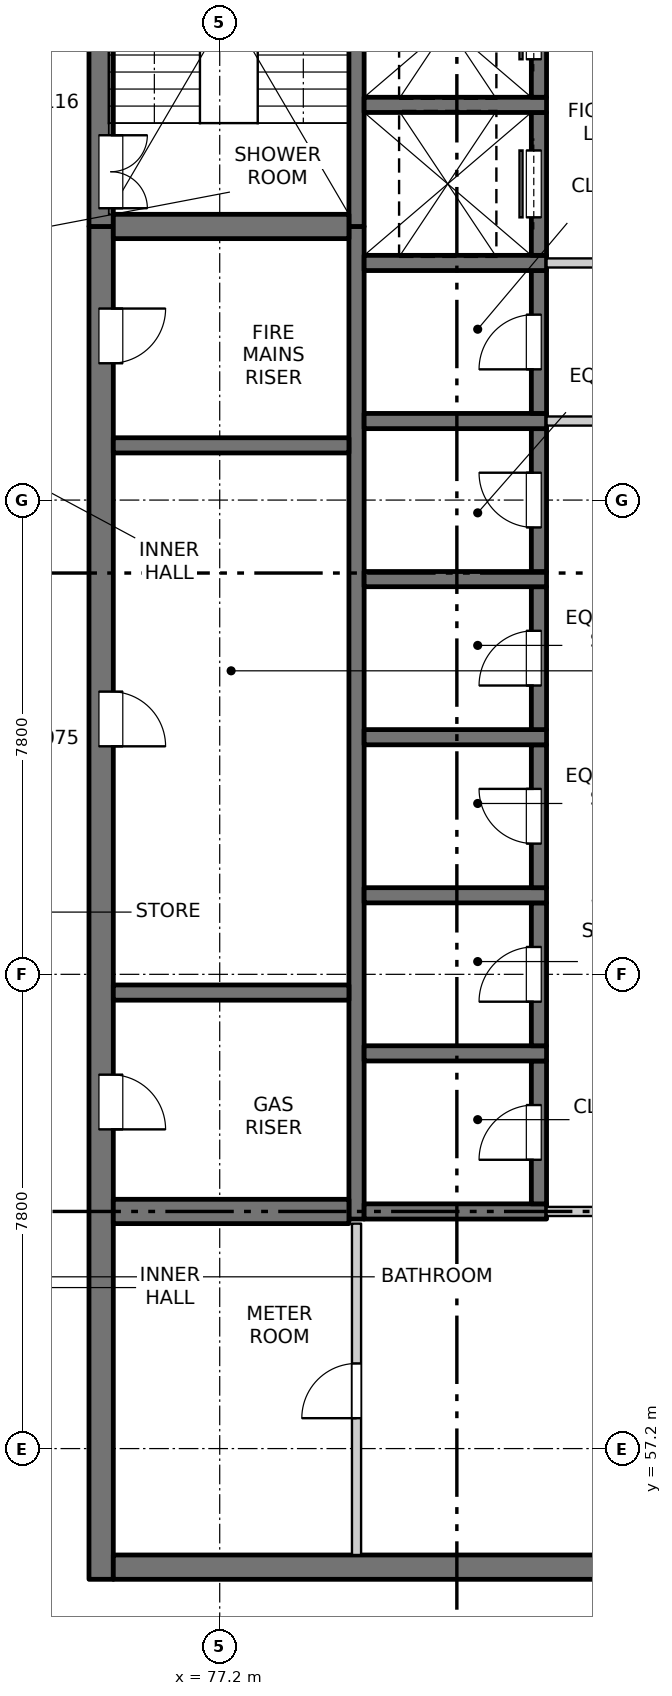
"""IFC4 building model, lengths in metres.
Left out: names, types, materials, properties, quantities, classifications, styles, units other than length and angle.
Written with IfcOpenShell. Run it as: python <this file> out.ifc"""

import sys

from ifc_helpers import new_model, si_unit, direction, frame, frame_2d, origin, place, context, subcontext, project, spatial, rectangle, extrude, element, fill, save


model = new_model("IFC4")
c1 = context("Model", 3, precision=1e-05, world=origin(), true_north=direction((0.0, 1.0)))
c2 = subcontext(c1, "Body", "Model", "MODEL_VIEW")
j1 = project(units=[si_unit("LENGTHUNIT", "METRE"), si_unit("PLANEANGLEUNIT", "RADIAN")], contexts=[c1])
p1 = place(None, origin())
s1 = spatial("IfcSite", under=j1, at=p1, CompositionType="ELEMENT")
p2 = place(p1, origin())
s2 = spatial("IfcBuilding", under=s1, at=p2, CompositionType="ELEMENT")
p3 = place(p2, frame((0.0, 0.0, 221.1)))
s3 = spatial("IfcBuildingStorey", under=s2, at=p3, CompositionType="ELEMENT", Elevation=221.1)
p4 = place(p3, frame((75.25, 55.05, -0.25), z_axis=(0.0, 0.0, 1.0), x_axis=(0.0, 1.0, 0.0)))
e1 = element("IfcWall", 1, at=p4, inside=s3, PredefinedType="SOLIDWALL", context=c2, shape_type="SweptSolid", body=[
    extrude(rectangle(XDim=22.25, YDim=0.4, at=frame_2d((11.125, 0.0))), origin(), (0.0, 0.0, 1.0), 3.4),
])
p5 = place(p4, frame((7.4, 0.0, 0.25)))
e2 = element("IfcOpeningElement", 2, at=p5, cuts=e1, PredefinedType="OPENING", context=c2, shape_type="SweptSolid", body=[
    extrude(rectangle(XDim=0.9, YDim=2.1, at=frame_2d((0.45, 1.05))), frame((0.0, 0.21, 0.0), z_axis=(0.0, -1.0, 0.0), x_axis=(1.0, 0.0, 0.0)), (0.0, 0.0, 1.0), 0.42),
])
p6 = place(p4, frame((13.7, 0.0, 0.25)))
e3 = element("IfcOpeningElement", 3, at=p6, cuts=e1, PredefinedType="OPENING", context=c2, shape_type="SweptSolid", body=[
    extrude(rectangle(XDim=0.9, YDim=2.1, at=frame_2d((0.45, 1.05))), frame((0.0, 0.21, 0.0), z_axis=(0.0, -1.0, 0.0), x_axis=(1.0, 0.0, 0.0)), (0.0, 0.0, 1.0), 0.42),
])
p7 = place(p4, frame((20.0, 0.0, 0.25)))
e4 = element("IfcOpeningElement", 4, at=p7, cuts=e1, PredefinedType="OPENING", context=c2, shape_type="SweptSolid", body=[
    extrude(rectangle(XDim=0.9, YDim=2.1, at=frame_2d((0.45, 1.05))), frame((0.0, 0.21, 0.0), z_axis=(0.0, -1.0, 0.0), x_axis=(1.0, 0.0, 0.0)), (0.0, 0.0, 1.0), 0.42),
])
p8 = place(p3, frame((75.25, 77.3, -0.25), z_axis=(0.0, 0.0, 1.0), x_axis=(0.0, 1.0, 0.0)))
e5 = element("IfcWall", 5, at=p8, inside=s3, PredefinedType="SOLIDWALL", context=c2, shape_type="SweptSolid", body=[
    extrude(rectangle(XDim=7.4, YDim=0.4, at=frame_2d((3.7, 0.0))), origin(), (0.0, 0.0, 1.0), 3.4),
])
p9 = place(p8, frame((0.3, 0.0, 0.25)))
e6 = element("IfcOpeningElement", 6, at=p9, cuts=e5, PredefinedType="OPENING", context=c2, shape_type="SweptSolid", body=[
    extrude(rectangle(XDim=1.2, YDim=2.1, at=frame_2d((0.6, 1.05))), frame((0.0, 0.21, 0.0), z_axis=(0.0, -1.0, 0.0), x_axis=(1.0, 0.0, 0.0)), (0.0, 0.0, 1.0), 0.42),
])
p10 = place(p3, frame((75.45, 55.25, -0.25), z_axis=(0.0, 0.0, 1.0), x_axis=(1.0, 0.0, 0.0)))
e7 = element("IfcWall", 7, at=p10, inside=s3, PredefinedType="SOLIDWALL", context=c2, shape_type="SweptSolid", body=[
    extrude(rectangle(XDim=19.1, YDim=0.4, at=frame_2d((9.55, 0.0))), origin(), (0.0, 0.0, 1.0), 3.4),
])
p11 = place(p10, frame((8.8, 0.0, 0.25)))
e8 = element("IfcOpeningElement", 8, at=p11, cuts=e7, PredefinedType="OPENING", context=c2, shape_type="SweptSolid", body=[
    extrude(rectangle(XDim=1.5, YDim=2.1, at=frame_2d((0.75, 1.05))), frame((0.0, 0.21, 0.0), z_axis=(0.0, -1.0, 0.0), x_axis=(1.0, 0.0, 0.0)), (0.0, 0.0, 1.0), 0.42),
])
p12 = place(p3, frame((79.45, 60.975, -0.25), z_axis=(0.0, 0.0, 1.0), x_axis=(0.0, 1.0, 0.0)))
e9 = element("IfcWall", 9, at=p12, inside=s3, PredefinedType="SOLIDWALL", context=c2, shape_type="SweptSolid", body=[
    extrude(rectangle(XDim=16.325, YDim=0.25, at=frame_2d((8.163, 0.0))), origin(), (0.0, 0.0, 1.0), 3.4),
])
p13 = place(p3, frame((79.45, 77.3, -0.25), z_axis=(0.0, 0.0, 1.0), x_axis=(0.0, 1.0, 0.0)))
e10 = element("IfcWall", 10, at=p13, inside=s3, PredefinedType="SOLIDWALL", context=c2, shape_type="SweptSolid", body=[
    extrude(rectangle(XDim=7.0, YDim=0.25, at=frame_2d((3.5, 0.0))), origin(), (0.0, 0.0, 1.0), 3.4),
])
p14 = place(p3, frame((79.575, 61.1, -0.25), z_axis=(0.0, 0.0, 1.0), x_axis=(1.0, 0.0, 0.0)))
e11 = element("IfcWall", 11, at=p14, inside=s3, PredefinedType="SOLIDWALL", context=c2, shape_type="SweptSolid", body=[
    extrude(rectangle(XDim=3.0, YDim=0.25, at=frame_2d((1.5, 0.0))), origin(), (0.0, 0.0, 1.0), 3.4),
])
p15 = place(p3, frame((82.45, 61.225, -0.25), z_axis=(0.0, 0.0, 1.0), x_axis=(0.0, 1.0, 0.0)))
e12 = element("IfcWall", 12, at=p15, inside=s3, PredefinedType="SOLIDWALL", context=c2, shape_type="SweptSolid", body=[
    extrude(rectangle(XDim=2.35, YDim=0.25, at=frame_2d((1.175, 0.0))), origin(), (0.0, 0.0, 1.0), 3.4),
])
p16 = place(p15, frame((0.725, 0.0, 0.25)))
e13 = element("IfcOpeningElement", 13, at=p16, cuts=e12, PredefinedType="OPENING", context=c2, shape_type="SweptSolid", body=[
    extrude(rectangle(XDim=0.9, YDim=2.1, at=frame_2d((0.45, 1.05))), frame((0.0, 0.135, 0.0), z_axis=(0.0, -1.0, 0.0), x_axis=(1.0, 0.0, 0.0)), (0.0, 0.0, 1.0), 0.27),
])
p17 = place(p3, frame((79.575, 63.7, -0.25), z_axis=(0.0, 0.0, 1.0), x_axis=(1.0, 0.0, 0.0)))
e14 = element("IfcWall", 14, at=p17, inside=s3, PredefinedType="SOLIDWALL", context=c2, shape_type="SweptSolid", body=[
    extrude(rectangle(XDim=3.0, YDim=0.25, at=frame_2d((1.5, 0.0))), origin(), (0.0, 0.0, 1.0), 3.4),
])
p18 = place(p3, frame((82.45, 63.825, -0.25), z_axis=(0.0, 0.0, 1.0), x_axis=(0.0, 1.0, 0.0)))
e15 = element("IfcWall", 15, at=p18, inside=s3, PredefinedType="SOLIDWALL", context=c2, shape_type="SweptSolid", body=[
    extrude(rectangle(XDim=2.35, YDim=0.25, at=frame_2d((1.175, 0.0))), origin(), (0.0, 0.0, 1.0), 3.4),
])
p19 = place(p18, frame((0.725, 0.0, 0.25)))
e16 = element("IfcOpeningElement", 16, at=p19, cuts=e15, PredefinedType="OPENING", context=c2, shape_type="SweptSolid", body=[
    extrude(rectangle(XDim=0.9, YDim=2.1, at=frame_2d((0.45, 1.05))), frame((0.0, 0.135, 0.0), z_axis=(0.0, -1.0, 0.0), x_axis=(1.0, 0.0, 0.0)), (0.0, 0.0, 1.0), 0.27),
])
p20 = place(p3, frame((79.575, 66.3, -0.25), z_axis=(0.0, 0.0, 1.0), x_axis=(1.0, 0.0, 0.0)))
e17 = element("IfcWall", 17, at=p20, inside=s3, PredefinedType="SOLIDWALL", context=c2, shape_type="SweptSolid", body=[
    extrude(rectangle(XDim=3.0, YDim=0.25, at=frame_2d((1.5, 0.0))), origin(), (0.0, 0.0, 1.0), 3.4),
])
p21 = place(p3, frame((82.45, 66.425, -0.25), z_axis=(0.0, 0.0, 1.0), x_axis=(0.0, 1.0, 0.0)))
e18 = element("IfcWall", 18, at=p21, inside=s3, PredefinedType="SOLIDWALL", context=c2, shape_type="SweptSolid", body=[
    extrude(rectangle(XDim=2.35, YDim=0.25, at=frame_2d((1.175, 0.0))), origin(), (0.0, 0.0, 1.0), 3.4),
])
p22 = place(p21, frame((0.725, 0.0, 0.25)))
e19 = element("IfcOpeningElement", 19, at=p22, cuts=e18, PredefinedType="OPENING", context=c2, shape_type="SweptSolid", body=[
    extrude(rectangle(XDim=0.9, YDim=2.1, at=frame_2d((0.45, 1.05))), frame((0.0, 0.135, 0.0), z_axis=(0.0, -1.0, 0.0), x_axis=(1.0, 0.0, 0.0)), (0.0, 0.0, 1.0), 0.27),
])
p23 = place(p3, frame((79.575, 68.9, -0.25), z_axis=(0.0, 0.0, 1.0), x_axis=(1.0, 0.0, 0.0)))
e20 = element("IfcWall", 20, at=p23, inside=s3, PredefinedType="SOLIDWALL", context=c2, shape_type="SweptSolid", body=[
    extrude(rectangle(XDim=3.0, YDim=0.25, at=frame_2d((1.5, 0.0))), origin(), (0.0, 0.0, 1.0), 3.4),
])
p24 = place(p3, frame((82.45, 69.025, -0.25), z_axis=(0.0, 0.0, 1.0), x_axis=(0.0, 1.0, 0.0)))
e21 = element("IfcWall", 21, at=p24, inside=s3, PredefinedType="SOLIDWALL", context=c2, shape_type="SweptSolid", body=[
    extrude(rectangle(XDim=2.35, YDim=0.25, at=frame_2d((1.175, 0.0))), origin(), (0.0, 0.0, 1.0), 3.4),
])
p25 = place(p24, frame((0.725, 0.0, 0.25)))
e22 = element("IfcOpeningElement", 22, at=p25, cuts=e21, PredefinedType="OPENING", context=c2, shape_type="SweptSolid", body=[
    extrude(rectangle(XDim=0.9, YDim=2.1, at=frame_2d((0.45, 1.05))), frame((0.0, 0.135, 0.0), z_axis=(0.0, -1.0, 0.0), x_axis=(1.0, 0.0, 0.0)), (0.0, 0.0, 1.0), 0.27),
])
p26 = place(p3, frame((79.575, 71.5, -0.25), z_axis=(0.0, 0.0, 1.0), x_axis=(1.0, 0.0, 0.0)))
e23 = element("IfcWall", 23, at=p26, inside=s3, PredefinedType="SOLIDWALL", context=c2, shape_type="SweptSolid", body=[
    extrude(rectangle(XDim=3.0, YDim=0.25, at=frame_2d((1.5, 0.0))), origin(), (0.0, 0.0, 1.0), 3.4),
])
p27 = place(p3, frame((82.45, 71.625, -0.25), z_axis=(0.0, 0.0, 1.0), x_axis=(0.0, 1.0, 0.0)))
e24 = element("IfcWall", 24, at=p27, inside=s3, PredefinedType="SOLIDWALL", context=c2, shape_type="SweptSolid", body=[
    extrude(rectangle(XDim=2.35, YDim=0.25, at=frame_2d((1.175, 0.0))), origin(), (0.0, 0.0, 1.0), 3.4),
])
p28 = place(p27, frame((0.725, 0.0, 0.25)))
e25 = element("IfcOpeningElement", 25, at=p28, cuts=e24, PredefinedType="OPENING", context=c2, shape_type="SweptSolid", body=[
    extrude(rectangle(XDim=0.9, YDim=2.1, at=frame_2d((0.45, 1.05))), frame((0.0, 0.135, 0.0), z_axis=(0.0, -1.0, 0.0), x_axis=(1.0, 0.0, 0.0)), (0.0, 0.0, 1.0), 0.27),
])
p29 = place(p3, frame((79.575, 74.1, -0.25), z_axis=(0.0, 0.0, 1.0), x_axis=(1.0, 0.0, 0.0)))
e26 = element("IfcWall", 26, at=p29, inside=s3, PredefinedType="SOLIDWALL", context=c2, shape_type="SweptSolid", body=[
    extrude(rectangle(XDim=3.0, YDim=0.25, at=frame_2d((1.5, 0.0))), origin(), (0.0, 0.0, 1.0), 3.4),
])
p30 = place(p3, frame((82.45, 74.225, -0.25), z_axis=(0.0, 0.0, 1.0), x_axis=(0.0, 1.0, 0.0)))
e27 = element("IfcWall", 27, at=p30, inside=s3, PredefinedType="SOLIDWALL", context=c2, shape_type="SweptSolid", body=[
    extrude(rectangle(XDim=2.35, YDim=0.25, at=frame_2d((1.175, 0.0))), origin(), (0.0, 0.0, 1.0), 3.4),
])
p31 = place(p30, frame((0.725, 0.0, 0.25)))
e28 = element("IfcOpeningElement", 28, at=p31, cuts=e27, PredefinedType="OPENING", context=c2, shape_type="SweptSolid", body=[
    extrude(rectangle(XDim=0.9, YDim=2.1, at=frame_2d((0.45, 1.05))), frame((0.0, 0.135, 0.0), z_axis=(0.0, -1.0, 0.0), x_axis=(1.0, 0.0, 0.0)), (0.0, 0.0, 1.0), 0.27),
])
p32 = place(p3, frame((79.575, 76.7, -0.25), z_axis=(0.0, 0.0, 1.0), x_axis=(1.0, 0.0, 0.0)))
e29 = element("IfcWall", 29, at=p32, inside=s3, PredefinedType="SOLIDWALL", context=c2, shape_type="SweptSolid", body=[
    extrude(rectangle(XDim=3.0, YDim=0.25, at=frame_2d((1.5, 0.0))), origin(), (0.0, 0.0, 1.0), 3.4),
])
p33 = place(p3, frame((82.45, 76.825, -0.25), z_axis=(0.0, 0.0, 1.0), x_axis=(0.0, 1.0, 0.0)))
e30 = element("IfcWall", 30, at=p33, inside=s3, PredefinedType="SOLIDWALL", context=c2, shape_type="SweptSolid", body=[
    extrude(rectangle(XDim=2.35, YDim=0.25, at=frame_2d((1.175, 0.0))), origin(), (0.0, 0.0, 1.0), 3.4),
])
p34 = place(p33, frame((0.625, 0.0, 0.25)))
e31 = element("IfcOpeningElement", 31, at=p34, cuts=e30, PredefinedType="OPENING", context=c2, shape_type="SweptSolid", body=[
    extrude(rectangle(XDim=1.1, YDim=2.1, at=frame_2d((0.55, 1.05))), frame((0.0, 0.135, 0.0), z_axis=(0.0, -1.0, 0.0), x_axis=(1.0, 0.0, 0.0)), (0.0, 0.0, 1.0), 0.27),
])
p35 = place(p3, frame((79.575, 79.3, -0.25), z_axis=(0.0, 0.0, 1.0), x_axis=(1.0, 0.0, 0.0)))
e32 = element("IfcWall", 32, at=p35, inside=s3, PredefinedType="SOLIDWALL", context=c2, shape_type="SweptSolid", body=[
    extrude(rectangle(XDim=3.0, YDim=0.25, at=frame_2d((1.5, 0.0))), origin(), (0.0, 0.0, 1.0), 3.4),
])
p36 = place(p3, frame((82.45, 79.425, -0.25), z_axis=(0.0, 0.0, 1.0), x_axis=(0.0, 1.0, 0.0)))
e33 = element("IfcWall", 33, at=p36, inside=s3, PredefinedType="SOLIDWALL", context=c2, shape_type="SweptSolid", body=[
    extrude(rectangle(XDim=2.35, YDim=0.25, at=frame_2d((1.175, 0.0))), origin(), (0.0, 0.0, 1.0), 3.4),
])
p37 = place(p36, frame((0.625, 0.0, 0.25)))
e34 = element("IfcOpeningElement", 34, at=p37, cuts=e33, PredefinedType="OPENING", context=c2, shape_type="SweptSolid", body=[
    extrude(rectangle(XDim=1.1, YDim=2.1, at=frame_2d((0.55, 1.05))), frame((0.0, 0.135, 0.0), z_axis=(0.0, -1.0, 0.0), x_axis=(1.0, 0.0, 0.0)), (0.0, 0.0, 1.0), 0.27),
])
p38 = place(p3, frame((75.45, 61.1, -0.25), z_axis=(0.0, 0.0, 1.0), x_axis=(1.0, 0.0, 0.0)))
e35 = element("IfcWall", 35, at=p38, inside=s3, PredefinedType="SOLIDWALL", context=c2, shape_type="SweptSolid", body=[
    extrude(rectangle(XDim=3.875, YDim=0.4, at=frame_2d((1.938, 0.0))), origin(), (0.0, 0.0, 1.0), 3.4),
])
for number, where, z_axis, x_axis in (
    (36, (75.45, 64.7, -0.25), (0.0, 0.0, 1.0), (1.0, 0.0, 0.0)),
    (37, (75.45, 73.7, -0.25), (0.0, 0.0, 1.0), (1.0, 0.0, 0.0)),
):
    element("IfcWall", number, at=place(p3, frame(where, z_axis=z_axis, x_axis=x_axis)), inside=s3, PredefinedType="SOLIDWALL", context=c2, shape_type="SweptSolid", body=[
        extrude(rectangle(XDim=3.875, YDim=0.25, at=frame_2d((1.938, 0.0))), origin(), (0.0, 0.0, 1.0), 3.4),
    ])
p39 = place(p3, frame((75.45, 77.3, -0.25), z_axis=(0.0, 0.0, 1.0), x_axis=(1.0, 0.0, 0.0)))
e38 = element("IfcWall", 38, at=p39, inside=s3, PredefinedType="SOLIDWALL", context=c2, shape_type="SweptSolid", body=[
    extrude(rectangle(XDim=3.875, YDim=0.4, at=frame_2d((1.938, 0.0))), origin(), (0.0, 0.0, 1.0), 3.4),
])
p40 = place(p3, frame((82.575, 61.1, 0.0), z_axis=(0.0, 0.0, 1.0), x_axis=(1.0, 0.0, 0.0)))
e39 = element("IfcWall", 39, at=p40, inside=s3, PredefinedType="PARTITIONING", context=c2, shape_type="SweptSolid", body=[
    extrude(rectangle(XDim=4.85, YDim=0.15, at=frame_2d((2.425, 0.0))), origin(), (0.0, 0.0, 1.0), 3.15),
])
p41 = place(p40, frame((1.525, 0.0, 0.0)))
e40 = element("IfcOpeningElement", 40, at=p41, cuts=e39, PredefinedType="OPENING", context=c2, shape_type="SweptSolid", body=[
    extrude(rectangle(XDim=1.8, YDim=2.1, at=frame_2d((0.9, 1.05))), frame((0.0, 0.085, 0.0), z_axis=(0.0, -1.0, 0.0), x_axis=(1.0, 0.0, 0.0)), (0.0, 0.0, 1.0), 0.17),
])
p42 = place(p3, frame((82.575, 74.1, 0.0), z_axis=(0.0, 0.0, 1.0), x_axis=(1.0, 0.0, 0.0)))
e41 = element("IfcWall", 41, at=p42, inside=s3, PredefinedType="PARTITIONING", context=c2, shape_type="SweptSolid", body=[
    extrude(rectangle(XDim=4.85, YDim=0.15, at=frame_2d((2.425, 0.0))), origin(), (0.0, 0.0, 1.0), 3.15),
])
p43 = place(p42, frame((1.525, 0.0, 0.0)))
e42 = element("IfcOpeningElement", 42, at=p43, cuts=e41, PredefinedType="OPENING", context=c2, shape_type="SweptSolid", body=[
    extrude(rectangle(XDim=1.8, YDim=2.1, at=frame_2d((0.9, 1.05))), frame((0.0, 0.085, 0.0), z_axis=(0.0, -1.0, 0.0), x_axis=(1.0, 0.0, 0.0)), (0.0, 0.0, 1.0), 0.17),
])
p44 = place(p3, frame((82.575, 76.7, 0.0), z_axis=(0.0, 0.0, 1.0), x_axis=(1.0, 0.0, 0.0)))
e43 = element("IfcWall", 43, at=p44, inside=s3, PredefinedType="PARTITIONING", context=c2, shape_type="SweptSolid", body=[
    extrude(rectangle(XDim=4.85, YDim=0.15, at=frame_2d((2.425, 0.0))), origin(), (0.0, 0.0, 1.0), 3.15),
])
p45 = place(p44, frame((1.525, 0.0, 0.0)))
e44 = element("IfcOpeningElement", 44, at=p45, cuts=e43, PredefinedType="OPENING", context=c2, shape_type="SweptSolid", body=[
    extrude(rectangle(XDim=1.8, YDim=2.1, at=frame_2d((0.9, 1.05))), frame((0.0, 0.085, 0.0), z_axis=(0.0, -1.0, 0.0), x_axis=(1.0, 0.0, 0.0)), (0.0, 0.0, 1.0), 0.17),
])
p46 = place(p3, frame((79.45, 55.45, 0.0), z_axis=(0.0, 0.0, 1.0), x_axis=(0.0, 1.0, 0.0)))
e45 = element("IfcWall", 45, at=p46, inside=s3, PredefinedType="PARTITIONING", context=c2, shape_type="SweptSolid", body=[
    extrude(rectangle(XDim=5.45, YDim=0.15, at=frame_2d((2.725, 0.0))), origin(), (0.0, 0.0, 1.0), 3.15),
])
p47 = place(p46, frame((2.25, 0.0, 0.0)))
e46 = element("IfcOpeningElement", 46, at=p47, cuts=e45, PredefinedType="OPENING", context=c2, shape_type="SweptSolid", body=[
    extrude(rectangle(XDim=0.9, YDim=2.1, at=frame_2d((0.45, 1.05))), frame((0.0, 0.085, 0.0), z_axis=(0.0, -1.0, 0.0), x_axis=(1.0, 0.0, 0.0)), (0.0, 0.0, 1.0), 0.17),
])
p48 = place(p47, origin())
e47 = element("IfcDoor", 47, at=p48, inside=s3, OperationType="SINGLE_SWING_LEFT", PredefinedType="DOOR", context=c2, shape_type="SweptSolid", body=[
    extrude(rectangle(XDim=0.9, YDim=2.1, at=frame_2d((0.45, 1.05))), frame((0.0, 0.025, 0.0), z_axis=(0.0, -1.0, 0.0), x_axis=(1.0, 0.0, 0.0)), (0.0, 0.0, 1.0), 0.05),
])
fill(e46, e47)
p49 = place(p16, origin())
e48 = element("IfcDoor", 48, at=p49, inside=s3, OperationType="SINGLE_SWING_LEFT", PredefinedType="DOOR", context=c2, shape_type="SweptSolid", body=[
    extrude(rectangle(XDim=0.9, YDim=2.1, at=frame_2d((0.45, 1.05))), frame((0.0, 0.11, 0.0), z_axis=(0.0, -1.0, 0.0), x_axis=(1.0, 0.0, 0.0)), (0.0, 0.0, 1.0), 0.05),
])
fill(e13, e48)
p50 = place(p5, origin())
e49 = element("IfcDoor", 49, at=p50, inside=s3, OperationType="SINGLE_SWING_RIGHT", PredefinedType="DOOR", context=c2, shape_type="SweptSolid", body=[
    extrude(rectangle(XDim=0.9, YDim=2.1, at=frame_2d((0.45, 1.05))), frame((0.0, -0.135, 0.0), z_axis=(0.0, -1.0, 0.0), x_axis=(1.0, 0.0, 0.0)), (0.0, 0.0, 1.0), 0.05),
])
fill(e2, e49)
p51 = place(p19, origin())
e50 = element("IfcDoor", 50, at=p51, inside=s3, OperationType="SINGLE_SWING_LEFT", PredefinedType="DOOR", context=c2, shape_type="SweptSolid", body=[
    extrude(rectangle(XDim=0.9, YDim=2.1, at=frame_2d((0.45, 1.05))), frame((0.0, 0.11, 0.0), z_axis=(0.0, -1.0, 0.0), x_axis=(1.0, 0.0, 0.0)), (0.0, 0.0, 1.0), 0.05),
])
fill(e16, e50)
p52 = place(p22, origin())
e51 = element("IfcDoor", 51, at=p52, inside=s3, OperationType="SINGLE_SWING_RIGHT", PredefinedType="DOOR", context=c2, shape_type="SweptSolid", body=[
    extrude(rectangle(XDim=0.9, YDim=2.1, at=frame_2d((0.45, 1.05))), frame((0.0, 0.11, 0.0), z_axis=(0.0, -1.0, 0.0), x_axis=(1.0, 0.0, 0.0)), (0.0, 0.0, 1.0), 0.05),
])
fill(e19, e51)
p53 = place(p6, origin())
e52 = element("IfcDoor", 52, at=p53, inside=s3, OperationType="SINGLE_SWING_RIGHT", PredefinedType="DOOR", context=c2, shape_type="SweptSolid", body=[
    extrude(rectangle(XDim=0.9, YDim=2.1, at=frame_2d((0.45, 1.05))), frame((0.0, -0.135, 0.0), z_axis=(0.0, -1.0, 0.0), x_axis=(1.0, 0.0, 0.0)), (0.0, 0.0, 1.0), 0.05),
])
fill(e3, e52)
p54 = place(p25, origin())
e53 = element("IfcDoor", 53, at=p54, inside=s3, OperationType="SINGLE_SWING_LEFT", PredefinedType="DOOR", context=c2, shape_type="SweptSolid", body=[
    extrude(rectangle(XDim=0.9, YDim=2.1, at=frame_2d((0.45, 1.05))), frame((0.0, 0.11, 0.0), z_axis=(0.0, -1.0, 0.0), x_axis=(1.0, 0.0, 0.0)), (0.0, 0.0, 1.0), 0.05),
])
fill(e22, e53)
p55 = place(p28, origin())
e54 = element("IfcDoor", 54, at=p55, inside=s3, OperationType="SINGLE_SWING_RIGHT", PredefinedType="DOOR", context=c2, shape_type="SweptSolid", body=[
    extrude(rectangle(XDim=0.9, YDim=2.1, at=frame_2d((0.45, 1.05))), frame((0.0, 0.11, 0.0), z_axis=(0.0, -1.0, 0.0), x_axis=(1.0, 0.0, 0.0)), (0.0, 0.0, 1.0), 0.05),
])
fill(e25, e54)
p56 = place(p31, origin())
e55 = element("IfcDoor", 55, at=p56, inside=s3, OperationType="SINGLE_SWING_LEFT", PredefinedType="DOOR", context=c2, shape_type="SweptSolid", body=[
    extrude(rectangle(XDim=0.9, YDim=2.1, at=frame_2d((0.45, 1.05))), frame((0.0, 0.11, 0.0), z_axis=(0.0, -1.0, 0.0), x_axis=(1.0, 0.0, 0.0)), (0.0, 0.0, 1.0), 0.05),
])
fill(e28, e55)
p57 = place(p7, origin())
e56 = element("IfcDoor", 56, at=p57, inside=s3, OperationType="SINGLE_SWING_LEFT", PredefinedType="DOOR", context=c2, shape_type="SweptSolid", body=[
    extrude(rectangle(XDim=0.9, YDim=2.1, at=frame_2d((0.45, 1.05))), frame((0.0, -0.135, 0.0), z_axis=(0.0, -1.0, 0.0), x_axis=(1.0, 0.0, 0.0)), (0.0, 0.0, 1.0), 0.05),
])
fill(e4, e56)
p58 = place(p34, origin())
e57 = element("IfcDoor", 57, at=p58, inside=s3, OperationType="SLIDING_TO_LEFT", PredefinedType="DOOR", context=c2, shape_type="SweptSolid", body=[
    extrude(rectangle(XDim=1.1, YDim=2.1, at=frame_2d((0.55, 1.05))), frame((0.0, 0.11, 0.0), z_axis=(0.0, -1.0, 0.0), x_axis=(1.0, 0.0, 0.0)), (0.0, 0.0, 1.0), 0.05),
])
fill(e31, e57)
p59 = place(p9, origin())
e58 = element("IfcDoor", 58, at=p59, inside=s3, OperationType="DOUBLE_DOOR_SINGLE_SWING", PredefinedType="DOOR", context=c2, shape_type="SweptSolid", body=[
    extrude(rectangle(XDim=1.2, YDim=2.1, at=frame_2d((0.6, 1.05))), frame((0.0, -0.135, 0.0), z_axis=(0.0, -1.0, 0.0), x_axis=(1.0, 0.0, 0.0)), (0.0, 0.0, 1.0), 0.05),
])
fill(e6, e58)
p60 = place(p37, origin())
e59 = element("IfcDoor", 59, at=p60, inside=s3, OperationType="SLIDING_TO_LEFT", PredefinedType="DOOR", context=c2, shape_type="SweptSolid", body=[
    extrude(rectangle(XDim=1.1, YDim=2.1, at=frame_2d((0.55, 1.05))), frame((0.0, 0.11, 0.0), z_axis=(0.0, -1.0, 0.0), x_axis=(1.0, 0.0, 0.0)), (0.0, 0.0, 1.0), 0.05),
])
fill(e34, e59)
save(model, sys.argv[1])
